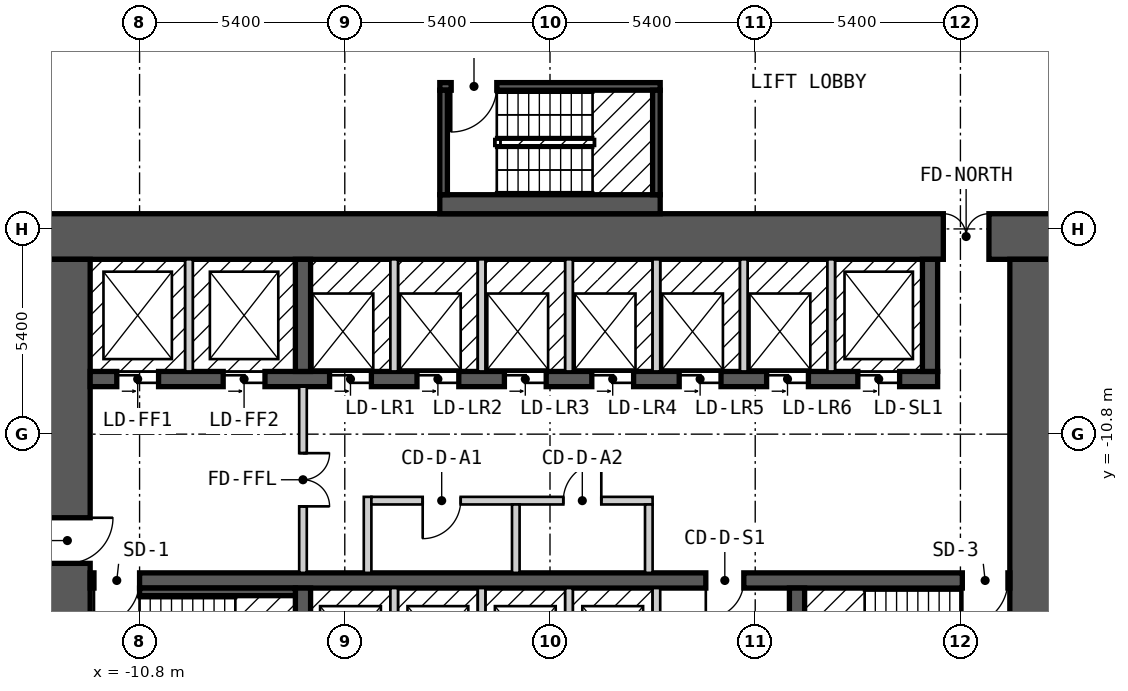
"""IFC4 building model, lengths in metres.
Left out: names, types, materials, properties, quantities, classifications, styles, units other than length and angle.
Written with IfcOpenShell. Run it as: python <this file> out.ifc"""

import sys

from ifc_helpers import new_model, si_unit, direction, frame, frame_2d, origin, place, context, subcontext, project, spatial, rectangle, extrude, element, fill, save


model = new_model("IFC4")
c1 = context("Model", 3, precision=1e-05, world=origin(), true_north=direction((0.0, 1.0)))
c2 = subcontext(c1, "Body", "Model", "MODEL_VIEW")
j1 = project(units=[si_unit("LENGTHUNIT", "METRE"), si_unit("PLANEANGLEUNIT", "RADIAN")], contexts=[c1])
p1 = place(None, origin())
s1 = spatial("IfcSite", under=j1, at=p1, CompositionType="ELEMENT")
p2 = place(p1, origin())
s2 = spatial("IfcBuilding", under=s1, at=p2, CompositionType="ELEMENT")
p3 = place(p2, frame((0.0, 0.0, 9.0)))
s3 = spatial("IfcBuildingStorey", under=s2, at=p3, CompositionType="ELEMENT", Elevation=9.0)
p4 = place(p3, frame((-13.3, -5.6, 0.0), z_axis=(0.0, 0.0, 1.0), x_axis=(1.0, 0.0, 0.0)))
e1 = element("IfcWall", 1, at=p4, inside=s3, PredefinedType="SHEAR", context=c2, shape_type="SweptSolid", body=[
    extrude(rectangle(XDim=26.6, YDim=1.2, at=frame_2d((13.3, 0.0))), origin(), (0.0, 0.0, 1.0), 3.25),
])
p5 = place(p4, frame((23.65, 0.0, 0.0)))
e2 = element("IfcOpeningElement", 2, at=p5, cuts=e1, PredefinedType="OPENING", context=c2, shape_type="SweptSolid", body=[
    extrude(rectangle(XDim=1.2, YDim=2.1, at=frame_2d((0.6, 1.05))), frame((0.0, 0.61, 0.0), z_axis=(0.0, -1.0, 0.0), x_axis=(1.0, 0.0, 0.0)), (0.0, 0.0, 1.0), 1.22),
])
p6 = place(p3, frame((-12.7, -17.8, 0.0), z_axis=(0.0, 0.0, 1.0), x_axis=(0.0, 1.0, 0.0)))
e3 = element("IfcWall", 3, at=p6, inside=s3, PredefinedType="SHEAR", context=c2, shape_type="SweptSolid", body=[
    extrude(rectangle(XDim=11.6, YDim=1.2, at=frame_2d((5.8, 0.0))), origin(), (0.0, 0.0, 1.0), 3.25),
])
p7 = place(p6, frame((3.6, 0.0, 0.0)))
e4 = element("IfcOpeningElement", 4, at=p7, cuts=e3, PredefinedType="OPENING", context=c2, shape_type="SweptSolid", body=[
    extrude(rectangle(XDim=1.2, YDim=2.1, at=frame_2d((0.6, 1.05))), frame((0.0, 0.61, 0.0), z_axis=(0.0, -1.0, 0.0), x_axis=(1.0, 0.0, 0.0)), (0.0, 0.0, 1.0), 1.22),
])
p8 = place(p3, frame((12.7, -17.8, 0.0), z_axis=(0.0, 0.0, 1.0), x_axis=(0.0, 1.0, 0.0)))
e5 = element("IfcWall", 5, at=p8, inside=s3, PredefinedType="SHEAR", context=c2, shape_type="SweptSolid", body=[
    extrude(rectangle(XDim=11.6, YDim=1.2, at=frame_2d((5.8, 0.0))), origin(), (0.0, 0.0, 1.0), 3.25),
])
p9 = place(p3, frame((-12.1, -14.65, 0.0), z_axis=(0.0, 0.0, 1.0), x_axis=(1.0, 0.0, 0.0)))
e6 = element("IfcWall", 6, at=p9, inside=s3, PredefinedType="SHEAR", context=c2, shape_type="SweptSolid", body=[
    extrude(rectangle(XDim=24.2, YDim=0.4, at=frame_2d((12.1, 0.0))), origin(), (0.0, 0.0, 1.0), 3.25),
])
p10 = place(p9, frame((1.3, 0.0, 0.0), z_axis=(0.0, 0.0, 1.0), x_axis=(-1.0, 0.0, 0.0)))
e7 = element("IfcOpeningElement", 7, at=p10, cuts=e6, PredefinedType="OPENING", context=c2, shape_type="SweptSolid", body=[
    extrude(rectangle(XDim=1.2, YDim=2.1, at=frame_2d((0.6, 1.05))), frame((0.0, 0.21, 0.0), z_axis=(0.0, -1.0, 0.0), x_axis=(1.0, 0.0, 0.0)), (0.0, 0.0, 1.0), 0.42),
])
p11 = place(p9, frame((24.15, 0.0, 0.0), z_axis=(0.0, 0.0, 1.0), x_axis=(-1.0, 0.0, 0.0)))
e8 = element("IfcOpeningElement", 8, at=p11, cuts=e6, PredefinedType="OPENING", context=c2, shape_type="SweptSolid", body=[
    extrude(rectangle(XDim=1.2, YDim=2.1, at=frame_2d((0.6, 1.05))), frame((0.0, 0.21, 0.0), z_axis=(0.0, -1.0, 0.0), x_axis=(1.0, 0.0, 0.0)), (0.0, 0.0, 1.0), 0.42),
])
p12 = place(p9, frame((17.2, 0.0, 0.0), z_axis=(0.0, 0.0, 1.0), x_axis=(-1.0, 0.0, 0.0)))
e9 = element("IfcOpeningElement", 9, at=p12, cuts=e6, PredefinedType="OPENING", context=c2, shape_type="SweptSolid", body=[
    extrude(rectangle(XDim=1.0, YDim=2.1, at=frame_2d((0.5, 1.05))), frame((0.0, 0.21, 0.0), z_axis=(0.0, -1.0, 0.0), x_axis=(1.0, 0.0, 0.0)), (0.0, 0.0, 1.0), 0.42),
])
p13 = place(p3, frame((-12.1, -9.35, 0.0), z_axis=(0.0, 0.0, 1.0), x_axis=(1.0, 0.0, 0.0)))
e10 = element("IfcWall", 10, at=p13, inside=s3, PredefinedType="SHEAR", context=c2, shape_type="SweptSolid", body=[
    extrude(rectangle(XDim=22.3, YDim=0.4, at=frame_2d((11.15, 0.0))), origin(), (0.0, 0.0, 1.0), 3.25),
])
p14 = place(p13, frame((0.7, 0.0, 0.0)))
e11 = element("IfcOpeningElement", 11, at=p14, cuts=e10, PredefinedType="OPENING", context=c2, shape_type="SweptSolid", body=[
    extrude(rectangle(XDim=1.1, YDim=2.1, at=frame_2d((0.55, 1.05))), frame((0.0, 0.21, 0.0), z_axis=(0.0, -1.0, 0.0), x_axis=(1.0, 0.0, 0.0)), (0.0, 0.0, 1.0), 0.42),
])
p15 = place(p13, frame((3.5, 0.0, 0.0)))
e12 = element("IfcOpeningElement", 12, at=p15, cuts=e10, PredefinedType="OPENING", context=c2, shape_type="SweptSolid", body=[
    extrude(rectangle(XDim=1.1, YDim=2.1, at=frame_2d((0.55, 1.05))), frame((0.0, 0.21, 0.0), z_axis=(0.0, -1.0, 0.0), x_axis=(1.0, 0.0, 0.0)), (0.0, 0.0, 1.0), 0.42),
])
p16 = place(p13, frame((6.3, 0.0, 0.0)))
e13 = element("IfcOpeningElement", 13, at=p16, cuts=e10, PredefinedType="OPENING", context=c2, shape_type="SweptSolid", body=[
    extrude(rectangle(XDim=1.1, YDim=2.1, at=frame_2d((0.55, 1.05))), frame((0.0, 0.21, 0.0), z_axis=(0.0, -1.0, 0.0), x_axis=(1.0, 0.0, 0.0)), (0.0, 0.0, 1.0), 0.42),
])
p17 = place(p13, frame((8.6, 0.0, 0.0)))
e14 = element("IfcOpeningElement", 14, at=p17, cuts=e10, PredefinedType="OPENING", context=c2, shape_type="SweptSolid", body=[
    extrude(rectangle(XDim=1.1, YDim=2.1, at=frame_2d((0.55, 1.05))), frame((0.0, 0.21, 0.0), z_axis=(0.0, -1.0, 0.0), x_axis=(1.0, 0.0, 0.0)), (0.0, 0.0, 1.0), 0.42),
])
p18 = place(p13, frame((10.9, 0.0, 0.0)))
e15 = element("IfcOpeningElement", 15, at=p18, cuts=e10, PredefinedType="OPENING", context=c2, shape_type="SweptSolid", body=[
    extrude(rectangle(XDim=1.1, YDim=2.1, at=frame_2d((0.55, 1.05))), frame((0.0, 0.21, 0.0), z_axis=(0.0, -1.0, 0.0), x_axis=(1.0, 0.0, 0.0)), (0.0, 0.0, 1.0), 0.42),
])
p19 = place(p13, frame((13.2, 0.0, 0.0)))
e16 = element("IfcOpeningElement", 16, at=p19, cuts=e10, PredefinedType="OPENING", context=c2, shape_type="SweptSolid", body=[
    extrude(rectangle(XDim=1.1, YDim=2.1, at=frame_2d((0.55, 1.05))), frame((0.0, 0.21, 0.0), z_axis=(0.0, -1.0, 0.0), x_axis=(1.0, 0.0, 0.0)), (0.0, 0.0, 1.0), 0.42),
])
p20 = place(p13, frame((15.5, 0.0, 0.0)))
e17 = element("IfcOpeningElement", 17, at=p20, cuts=e10, PredefinedType="OPENING", context=c2, shape_type="SweptSolid", body=[
    extrude(rectangle(XDim=1.1, YDim=2.1, at=frame_2d((0.55, 1.05))), frame((0.0, 0.21, 0.0), z_axis=(0.0, -1.0, 0.0), x_axis=(1.0, 0.0, 0.0)), (0.0, 0.0, 1.0), 0.42),
])
p21 = place(p13, frame((17.8, 0.0, 0.0)))
e18 = element("IfcOpeningElement", 18, at=p21, cuts=e10, PredefinedType="OPENING", context=c2, shape_type="SweptSolid", body=[
    extrude(rectangle(XDim=1.1, YDim=2.1, at=frame_2d((0.55, 1.05))), frame((0.0, 0.21, 0.0), z_axis=(0.0, -1.0, 0.0), x_axis=(1.0, 0.0, 0.0)), (0.0, 0.0, 1.0), 0.42),
])
p22 = place(p13, frame((20.2, 0.0, 0.0)))
e19 = element("IfcOpeningElement", 19, at=p22, cuts=e10, PredefinedType="OPENING", context=c2, shape_type="SweptSolid", body=[
    extrude(rectangle(XDim=1.1, YDim=2.1, at=frame_2d((0.55, 1.05))), frame((0.0, 0.21, 0.0), z_axis=(0.0, -1.0, 0.0), x_axis=(1.0, 0.0, 0.0)), (0.0, 0.0, 1.0), 0.42),
])
for number, where, z_axis, x_axis in (
    (20, (-6.5, -17.8, 0.0), (0.0, 0.0, 1.0), (0.0, 1.0, 0.0)),
    (21, (6.5, -17.8, 0.0), (0.0, 0.0, 1.0), (0.0, 1.0, 0.0)),
    (22, (-6.5, -9.15, 0.0), (0.0, 0.0, 1.0), (0.0, 1.0, 0.0)),
    (23, (10.0, -9.15, 0.0), (0.0, 0.0, 1.0), (0.0, 1.0, 0.0)),
):
    element("IfcWall", number, at=place(p3, frame(where, z_axis=z_axis, x_axis=x_axis)), inside=s3, PredefinedType="SHEAR", context=c2, shape_type="SweptSolid", body=[
        extrude(rectangle(XDim=2.95, YDim=0.4, at=frame_2d((1.475, 0.0))), origin(), (0.0, 0.0, 1.0), 3.25),
    ])
p23 = place(p3, frame((-2.9, -4.75, 0.0), z_axis=(0.0, 0.0, 1.0), x_axis=(1.0, 0.0, 0.0)))
e24 = element("IfcWall", 24, at=p23, inside=s3, PredefinedType="SOLIDWALL", context=c2, shape_type="SweptSolid", body=[
    extrude(rectangle(XDim=5.8, YDim=0.5, at=frame_2d((2.9, 0.0))), origin(), (0.0, 0.0, 1.0), 3.25),
])
p24 = place(p3, frame((-2.9, -1.65, 0.0), z_axis=(0.0, 0.0, 1.0), x_axis=(1.0, 0.0, 0.0)))
e25 = element("IfcWall", 25, at=p24, inside=s3, PredefinedType="SOLIDWALL", context=c2, shape_type="SweptSolid", body=[
    extrude(rectangle(XDim=5.8, YDim=0.2, at=frame_2d((2.9, 0.0))), origin(), (0.0, 0.0, 1.0), 3.25),
])
p25 = place(p24, frame((0.3, 0.0, 0.0)))
e26 = element("IfcOpeningElement", 26, at=p25, cuts=e25, PredefinedType="OPENING", context=c2, shape_type="SweptSolid", body=[
    extrude(rectangle(XDim=1.2, YDim=2.1, at=frame_2d((0.6, 1.05))), frame((0.0, 0.11, 0.0), z_axis=(0.0, -1.0, 0.0), x_axis=(1.0, 0.0, 0.0)), (0.0, 0.0, 1.0), 0.22),
])
for number, where, z_axis, x_axis in (
    (27, (-2.8, -4.5, 0.0), (0.0, 0.0, 1.0), (0.0, 1.0, 0.0)),
    (28, (2.8, -4.5, 0.0), (0.0, 0.0, 1.0), (0.0, 1.0, 0.0)),
):
    element("IfcWall", number, at=place(p3, frame(where, z_axis=z_axis, x_axis=x_axis)), inside=s3, PredefinedType="SOLIDWALL", context=c2, shape_type="SweptSolid", body=[
        extrude(rectangle(XDim=2.75, YDim=0.2, at=frame_2d((1.375, 0.0))), origin(), (0.0, 0.0, 1.0), 3.25),
    ])
p26 = place(p3, frame((-10.8, -14.95, 0.0), z_axis=(0.0, 0.0, 1.0), x_axis=(1.0, 0.0, 0.0)))
e29 = element("IfcWall", 29, at=p26, inside=s3, PredefinedType="SOLIDWALL", context=c2, shape_type="SweptSolid", body=[
    extrude(rectangle(XDim=4.1, YDim=0.2, at=frame_2d((2.05, 0.0))), origin(), (0.0, 0.0, 1.0), 3.25),
])
p27 = place(p3, frame((-9.5, -9.15, 0.0), z_axis=(0.0, 0.0, 1.0), x_axis=(0.0, 1.0, 0.0)))
e30 = element("IfcWall", 30, at=p27, inside=s3, PredefinedType="SOLIDWALL", context=c2, shape_type="SweptSolid", body=[
    extrude(rectangle(XDim=2.95, YDim=0.2, at=frame_2d((1.475, 0.0))), origin(), (0.0, 0.0, 1.0), 3.25),
])
p28 = place(p3, frame((-6.5, -14.45, 0.0), z_axis=(0.0, 0.0, 1.0), x_axis=(0.0, 1.0, 0.0)))
e31 = element("IfcWall", 31, at=p28, inside=s3, PredefinedType="PARTITIONING", context=c2, shape_type="SweptSolid", body=[
    extrude(rectangle(XDim=4.9, YDim=0.2, at=frame_2d((2.45, 0.0))), origin(), (0.0, 0.0, 1.0), 3.25),
])
p29 = place(p28, frame((3.15, 0.0, 0.0), z_axis=(0.0, 0.0, 1.0), x_axis=(-1.0, 0.0, 0.0)))
e32 = element("IfcOpeningElement", 32, at=p29, cuts=e31, PredefinedType="OPENING", context=c2, shape_type="SweptSolid", body=[
    extrude(rectangle(XDim=1.4, YDim=2.1, at=frame_2d((0.7, 1.05))), frame((0.0, 0.11, 0.0), z_axis=(0.0, -1.0, 0.0), x_axis=(1.0, 0.0, 0.0)), (0.0, 0.0, 1.0), 0.22),
])
p30 = place(p3, frame((-4.8, -14.45, 0.0), z_axis=(0.0, 0.0, 1.0), x_axis=(0.0, 1.0, 0.0)))
e33 = element("IfcWall", 33, at=p30, inside=s3, PredefinedType="PARTITIONING", context=c2, shape_type="SweptSolid", body=[
    extrude(rectangle(XDim=2.0, YDim=0.2, at=frame_2d((1.0, 0.0))), origin(), (0.0, 0.0, 1.0), 3.25),
])
p31 = place(p3, frame((-4.7, -12.55, 0.0), z_axis=(0.0, 0.0, 1.0), x_axis=(1.0, 0.0, 0.0)))
e34 = element("IfcWall", 34, at=p31, inside=s3, PredefinedType="PARTITIONING", context=c2, shape_type="SweptSolid", body=[
    extrude(rectangle(XDim=7.4, YDim=0.2, at=frame_2d((3.7, 0.0))), origin(), (0.0, 0.0, 1.0), 3.25),
])
p32 = place(p31, frame((2.35, 0.0, 0.0), z_axis=(0.0, 0.0, 1.0), x_axis=(-1.0, 0.0, 0.0)))
e35 = element("IfcOpeningElement", 35, at=p32, cuts=e34, PredefinedType="OPENING", context=c2, shape_type="SweptSolid", body=[
    extrude(rectangle(XDim=1.0, YDim=2.1, at=frame_2d((0.5, 1.05))), frame((0.0, 0.11, 0.0), z_axis=(0.0, -1.0, 0.0), x_axis=(1.0, 0.0, 0.0)), (0.0, 0.0, 1.0), 0.22),
])
p33 = place(p31, frame((6.05, 0.0, 0.0), z_axis=(0.0, 0.0, 1.0), x_axis=(-1.0, 0.0, 0.0)))
e36 = element("IfcOpeningElement", 36, at=p33, cuts=e34, PredefinedType="OPENING", context=c2, shape_type="SweptSolid", body=[
    extrude(rectangle(XDim=1.0, YDim=2.1, at=frame_2d((0.5, 1.05))), frame((0.0, 0.11, 0.0), z_axis=(0.0, -1.0, 0.0), x_axis=(1.0, 0.0, 0.0)), (0.0, 0.0, 1.0), 0.22),
])
for number, where, z_axis, x_axis in (
    (37, (-4.1, -17.8, 0.0), (0.0, 0.0, 1.0), (0.0, 1.0, 0.0)),
    (38, (-4.1, -9.15, 0.0), (0.0, 0.0, 1.0), (0.0, 1.0, 0.0)),
    (39, (-1.8, -17.8, 0.0), (0.0, 0.0, 1.0), (0.0, 1.0, 0.0)),
    (40, (-1.8, -9.15, 0.0), (0.0, 0.0, 1.0), (0.0, 1.0, 0.0)),
):
    element("IfcWall", number, at=place(p3, frame(where, z_axis=z_axis, x_axis=x_axis)), inside=s3, PredefinedType="SOLIDWALL", context=c2, shape_type="SweptSolid", body=[
        extrude(rectangle(XDim=2.95, YDim=0.2, at=frame_2d((1.475, 0.0))), origin(), (0.0, 0.0, 1.0), 3.25),
    ])
p34 = place(p3, frame((-0.9, -14.45, 0.0), z_axis=(0.0, 0.0, 1.0), x_axis=(0.0, 1.0, 0.0)))
e41 = element("IfcWall", 41, at=p34, inside=s3, PredefinedType="PARTITIONING", context=c2, shape_type="SweptSolid", body=[
    extrude(rectangle(XDim=1.8, YDim=0.2, at=frame_2d((0.9, 0.0))), origin(), (0.0, 0.0, 1.0), 3.25),
])
for number, where, z_axis, x_axis in (
    (42, (0.5, -17.8, 0.0), (0.0, 0.0, 1.0), (0.0, 1.0, 0.0)),
    (43, (0.5, -9.15, 0.0), (0.0, 0.0, 1.0), (0.0, 1.0, 0.0)),
):
    element("IfcWall", number, at=place(p3, frame(where, z_axis=z_axis, x_axis=x_axis)), inside=s3, PredefinedType="SOLIDWALL", context=c2, shape_type="SweptSolid", body=[
        extrude(rectangle(XDim=2.95, YDim=0.2, at=frame_2d((1.475, 0.0))), origin(), (0.0, 0.0, 1.0), 3.25),
    ])
p35 = place(p3, frame((2.6, -14.45, 0.0), z_axis=(0.0, 0.0, 1.0), x_axis=(0.0, 1.0, 0.0)))
e44 = element("IfcWall", 44, at=p35, inside=s3, PredefinedType="PARTITIONING", context=c2, shape_type="SweptSolid", body=[
    extrude(rectangle(XDim=1.8, YDim=0.2, at=frame_2d((0.9, 0.0))), origin(), (0.0, 0.0, 1.0), 3.25),
])
for number, where, z_axis, x_axis in (
    (45, (2.8, -17.8, 0.0), (0.0, 0.0, 1.0), (0.0, 1.0, 0.0)),
    (46, (2.8, -9.15, 0.0), (0.0, 0.0, 1.0), (0.0, 1.0, 0.0)),
    (47, (5.1, -9.15, 0.0), (0.0, 0.0, 1.0), (0.0, 1.0, 0.0)),
    (48, (7.4, -9.15, 0.0), (0.0, 0.0, 1.0), (0.0, 1.0, 0.0)),
):
    element("IfcWall", number, at=place(p3, frame(where, z_axis=z_axis, x_axis=x_axis)), inside=s3, PredefinedType="SOLIDWALL", context=c2, shape_type="SweptSolid", body=[
        extrude(rectangle(XDim=2.95, YDim=0.2, at=frame_2d((1.475, 0.0))), origin(), (0.0, 0.0, 1.0), 3.25),
    ])
p36 = place(p25, origin())
e49 = element("IfcDoor", 49, at=p36, inside=s3, OperationType="SINGLE_SWING_LEFT", PredefinedType="DOOR", context=c2, shape_type="SweptSolid", body=[
    extrude(rectangle(XDim=1.2, YDim=2.1, at=frame_2d((0.6, 1.05))), frame((0.0, 0.025, 0.0), z_axis=(0.0, -1.0, 0.0), x_axis=(1.0, 0.0, 0.0)), (0.0, 0.0, 1.0), 0.05),
])
fill(e26, e49)
p37 = place(p14, origin())
e50 = element("IfcDoor", 50, at=p37, inside=s3, OperationType="DOUBLE_DOOR_SLIDING", PredefinedType="DOOR", context=c2, shape_type="SweptSolid", body=[
    extrude(rectangle(XDim=1.1, YDim=2.1, at=frame_2d((0.55, 1.05))), frame((0.0, 0.025, 0.0), z_axis=(0.0, -1.0, 0.0), x_axis=(1.0, 0.0, 0.0)), (0.0, 0.0, 1.0), 0.05),
])
fill(e11, e50)
p38 = place(p15, origin())
e51 = element("IfcDoor", 51, at=p38, inside=s3, OperationType="DOUBLE_DOOR_SLIDING", PredefinedType="DOOR", context=c2, shape_type="SweptSolid", body=[
    extrude(rectangle(XDim=1.1, YDim=2.1, at=frame_2d((0.55, 1.05))), frame((0.0, 0.025, 0.0), z_axis=(0.0, -1.0, 0.0), x_axis=(1.0, 0.0, 0.0)), (0.0, 0.0, 1.0), 0.05),
])
fill(e12, e51)
p39 = place(p16, origin())
e52 = element("IfcDoor", 52, at=p39, inside=s3, OperationType="DOUBLE_DOOR_SLIDING", PredefinedType="DOOR", context=c2, shape_type="SweptSolid", body=[
    extrude(rectangle(XDim=1.1, YDim=2.1, at=frame_2d((0.55, 1.05))), frame((0.0, 0.025, 0.0), z_axis=(0.0, -1.0, 0.0), x_axis=(1.0, 0.0, 0.0)), (0.0, 0.0, 1.0), 0.05),
])
fill(e13, e52)
p40 = place(p17, origin())
e53 = element("IfcDoor", 53, at=p40, inside=s3, OperationType="DOUBLE_DOOR_SLIDING", PredefinedType="DOOR", context=c2, shape_type="SweptSolid", body=[
    extrude(rectangle(XDim=1.1, YDim=2.1, at=frame_2d((0.55, 1.05))), frame((0.0, 0.025, 0.0), z_axis=(0.0, -1.0, 0.0), x_axis=(1.0, 0.0, 0.0)), (0.0, 0.0, 1.0), 0.05),
])
fill(e14, e53)
p41 = place(p18, origin())
e54 = element("IfcDoor", 54, at=p41, inside=s3, OperationType="DOUBLE_DOOR_SLIDING", PredefinedType="DOOR", context=c2, shape_type="SweptSolid", body=[
    extrude(rectangle(XDim=1.1, YDim=2.1, at=frame_2d((0.55, 1.05))), frame((0.0, 0.025, 0.0), z_axis=(0.0, -1.0, 0.0), x_axis=(1.0, 0.0, 0.0)), (0.0, 0.0, 1.0), 0.05),
])
fill(e15, e54)
p42 = place(p19, origin())
e55 = element("IfcDoor", 55, at=p42, inside=s3, OperationType="DOUBLE_DOOR_SLIDING", PredefinedType="DOOR", context=c2, shape_type="SweptSolid", body=[
    extrude(rectangle(XDim=1.1, YDim=2.1, at=frame_2d((0.55, 1.05))), frame((0.0, 0.025, 0.0), z_axis=(0.0, -1.0, 0.0), x_axis=(1.0, 0.0, 0.0)), (0.0, 0.0, 1.0), 0.05),
])
fill(e16, e55)
p43 = place(p20, origin())
e56 = element("IfcDoor", 56, at=p43, inside=s3, OperationType="DOUBLE_DOOR_SLIDING", PredefinedType="DOOR", context=c2, shape_type="SweptSolid", body=[
    extrude(rectangle(XDim=1.1, YDim=2.1, at=frame_2d((0.55, 1.05))), frame((0.0, 0.025, 0.0), z_axis=(0.0, -1.0, 0.0), x_axis=(1.0, 0.0, 0.0)), (0.0, 0.0, 1.0), 0.05),
])
fill(e17, e56)
p44 = place(p21, origin())
e57 = element("IfcDoor", 57, at=p44, inside=s3, OperationType="DOUBLE_DOOR_SLIDING", PredefinedType="DOOR", context=c2, shape_type="SweptSolid", body=[
    extrude(rectangle(XDim=1.1, YDim=2.1, at=frame_2d((0.55, 1.05))), frame((0.0, 0.025, 0.0), z_axis=(0.0, -1.0, 0.0), x_axis=(1.0, 0.0, 0.0)), (0.0, 0.0, 1.0), 0.05),
])
fill(e18, e57)
p45 = place(p22, origin())
e58 = element("IfcDoor", 58, at=p45, inside=s3, OperationType="DOUBLE_DOOR_SLIDING", PredefinedType="DOOR", context=c2, shape_type="SweptSolid", body=[
    extrude(rectangle(XDim=1.1, YDim=2.1, at=frame_2d((0.55, 1.05))), frame((0.0, 0.025, 0.0), z_axis=(0.0, -1.0, 0.0), x_axis=(1.0, 0.0, 0.0)), (0.0, 0.0, 1.0), 0.05),
])
fill(e19, e58)
p46 = place(p10, origin())
e59 = element("IfcDoor", 59, at=p46, inside=s3, OperationType="SINGLE_SWING_RIGHT", PredefinedType="DOOR", context=c2, shape_type="SweptSolid", body=[
    extrude(rectangle(XDim=1.2, YDim=2.1, at=frame_2d((0.6, 1.05))), frame((0.0, 0.025, 0.0), z_axis=(0.0, -1.0, 0.0), x_axis=(1.0, 0.0, 0.0)), (0.0, 0.0, 1.0), 0.05),
])
fill(e7, e59)
p47 = place(p11, origin())
e60 = element("IfcDoor", 60, at=p47, inside=s3, OperationType="SINGLE_SWING_RIGHT", PredefinedType="DOOR", context=c2, shape_type="SweptSolid", body=[
    extrude(rectangle(XDim=1.2, YDim=2.1, at=frame_2d((0.6, 1.05))), frame((0.0, 0.025, 0.0), z_axis=(0.0, -1.0, 0.0), x_axis=(1.0, 0.0, 0.0)), (0.0, 0.0, 1.0), 0.05),
])
fill(e8, e60)
p48 = place(p7, origin())
e61 = element("IfcDoor", 61, at=p48, inside=s3, OperationType="SINGLE_SWING_RIGHT", PredefinedType="DOOR", context=c2, shape_type="SweptSolid", body=[
    extrude(rectangle(XDim=1.2, YDim=2.1, at=frame_2d((0.6, 1.05))), frame((0.0, 0.025, 0.0), z_axis=(0.0, -1.0, 0.0), x_axis=(1.0, 0.0, 0.0)), (0.0, 0.0, 1.0), 0.05),
])
fill(e4, e61)
p49 = place(p29, origin())
e62 = element("IfcDoor", 62, at=p49, inside=s3, OperationType="DOUBLE_DOOR_SINGLE_SWING", PredefinedType="DOOR", context=c2, shape_type="SweptSolid", body=[
    extrude(rectangle(XDim=1.4, YDim=2.1, at=frame_2d((0.7, 1.05))), frame((0.0, 0.025, 0.0), z_axis=(0.0, -1.0, 0.0), x_axis=(1.0, 0.0, 0.0)), (0.0, 0.0, 1.0), 0.05),
])
fill(e32, e62)
p50 = place(p5, origin())
e63 = element("IfcDoor", 63, at=p50, inside=s3, OperationType="DOUBLE_DOOR_SINGLE_SWING", PredefinedType="DOOR", context=c2, shape_type="SweptSolid", body=[
    extrude(rectangle(XDim=1.2, YDim=2.1, at=frame_2d((0.6, 1.05))), frame((0.0, 0.025, 0.0), z_axis=(0.0, -1.0, 0.0), x_axis=(1.0, 0.0, 0.0)), (0.0, 0.0, 1.0), 0.05),
])
fill(e2, e63)
p51 = place(p32, origin())
e64 = element("IfcDoor", 64, at=p51, inside=s3, OperationType="SINGLE_SWING_RIGHT", PredefinedType="DOOR", context=c2, shape_type="SweptSolid", body=[
    extrude(rectangle(XDim=1.0, YDim=2.1, at=frame_2d((0.5, 1.05))), frame((0.0, 0.025, 0.0), z_axis=(0.0, -1.0, 0.0), x_axis=(1.0, 0.0, 0.0)), (0.0, 0.0, 1.0), 0.05),
])
fill(e35, e64)
p52 = place(p33, origin())
e65 = element("IfcDoor", 65, at=p52, inside=s3, OperationType="SINGLE_SWING_LEFT", PredefinedType="DOOR", context=c2, shape_type="SweptSolid", body=[
    extrude(rectangle(XDim=1.0, YDim=2.1, at=frame_2d((0.5, 1.05))), frame((0.0, 0.025, 0.0), z_axis=(0.0, -1.0, 0.0), x_axis=(1.0, 0.0, 0.0)), (0.0, 0.0, 1.0), 0.05),
])
fill(e36, e65)
p53 = place(p12, origin())
e66 = element("IfcDoor", 66, at=p53, inside=s3, OperationType="SINGLE_SWING_RIGHT", PredefinedType="DOOR", context=c2, shape_type="SweptSolid", body=[
    extrude(rectangle(XDim=1.0, YDim=2.1, at=frame_2d((0.5, 1.05))), frame((0.0, 0.025, 0.0), z_axis=(0.0, -1.0, 0.0), x_axis=(1.0, 0.0, 0.0)), (0.0, 0.0, 1.0), 0.05),
])
fill(e9, e66)
save(model, sys.argv[1])
